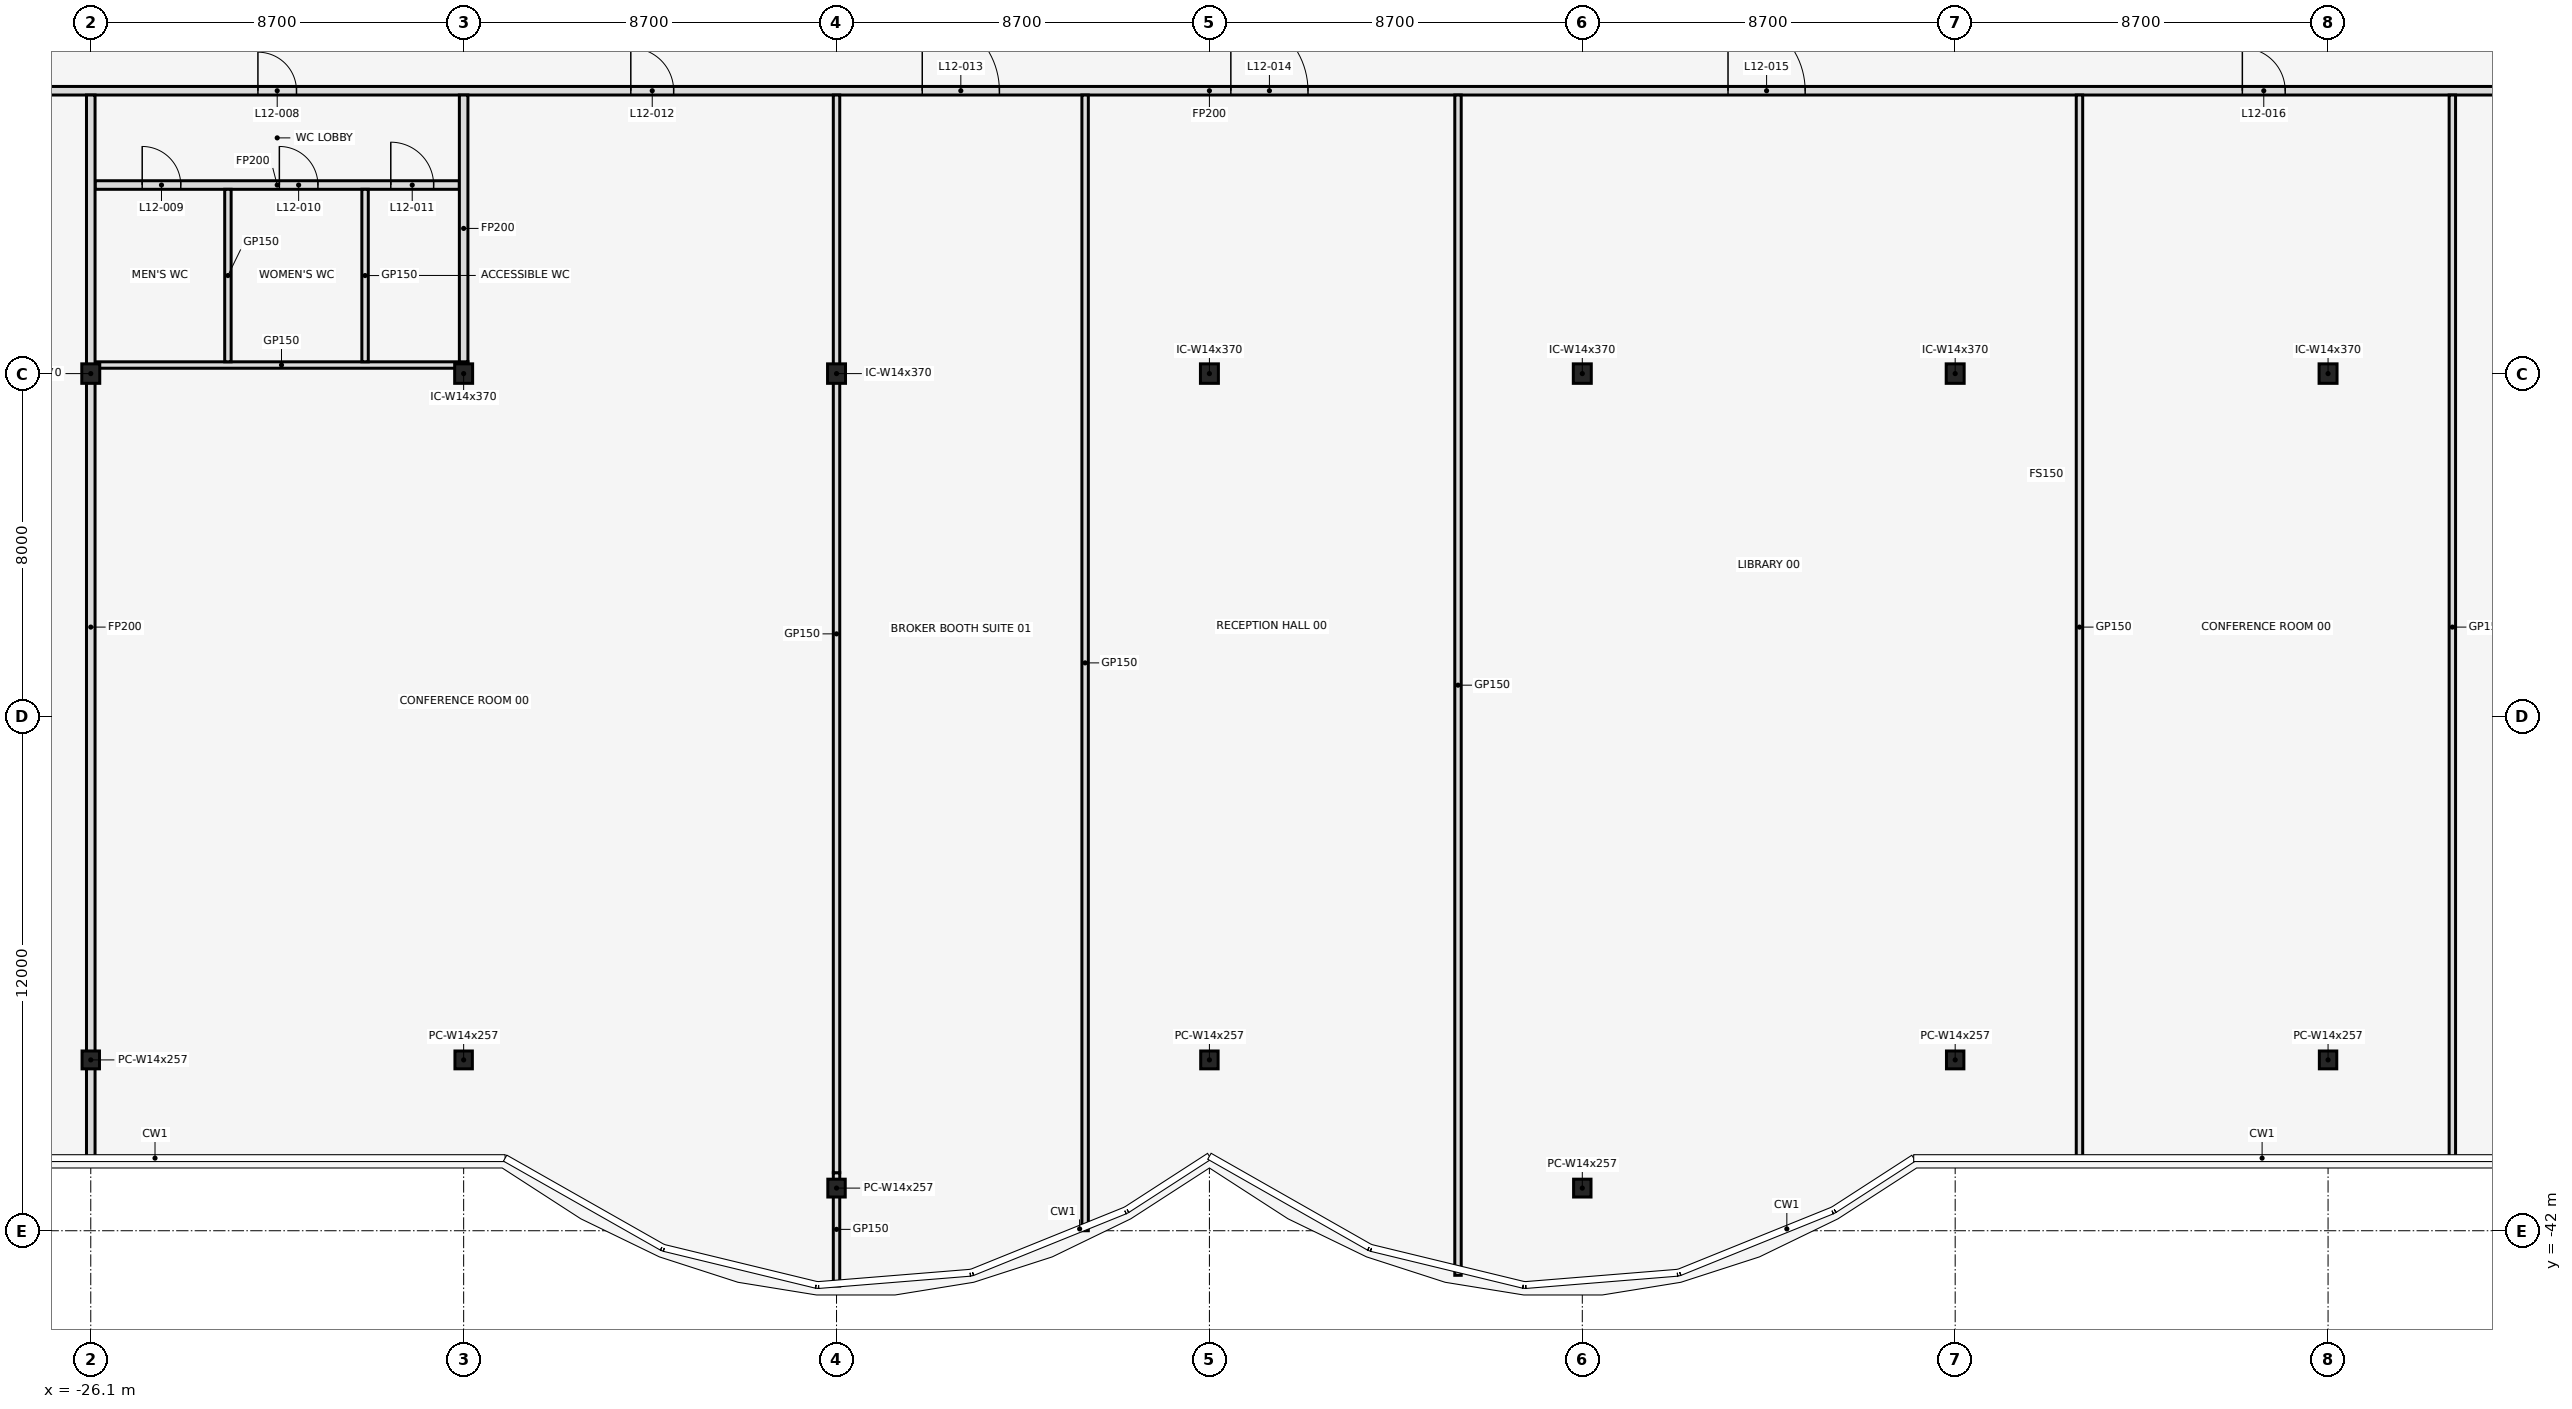
"""IFC4 building model, lengths in metres.
Left out: names, types, materials, properties, quantities, classifications, styles, units other than length and angle.
Written with IfcOpenShell. Run it as: python <this file> out.ifc"""

import sys

from ifc_helpers import new_model, si_unit, direction, frame, frame_2d, origin, origin_2d, place, context, subcontext, project, spatial, rectangle, i_section, extrude, element, fill, save


model = new_model("IFC4")
c1 = context("Model", 3, precision=1e-05, world=origin(), true_north=direction((0.0, 1.0)))
c2 = subcontext(c1, "Body", "Model", "MODEL_VIEW")
j1 = project(units=[si_unit("LENGTHUNIT", "METRE"), si_unit("PLANEANGLEUNIT", "RADIAN")], contexts=[c1])
p1 = place(None, origin())
s1 = spatial("IfcSite", under=j1, at=p1, CompositionType="ELEMENT")
p2 = place(p1, origin())
s2 = spatial("IfcBuilding", under=s1, at=p2, CompositionType="ELEMENT")
p3 = place(p2, frame((0.0, 0.0, 62.0)))
s3 = spatial("IfcBuildingStorey", under=s2, at=p3, CompositionType="ELEMENT", Elevation=62.0)
for number, where, z_axis, x_axis in (
    (1, (-26.1, -38.014, 0.0), (0.0, 0.0, 1.0), (1.0, 0.0, 0.0)),
    (2, (-17.4, -38.014, 0.0), (0.0, 0.0, 1.0), (1.0, 0.0, 0.0)),
    (3, (-8.7, -41.005, 0.0), (0.0, 0.0, 1.0), (1.0, 0.0, 0.0)),
    (4, (0.0, -38.014, 0.0), (0.0, 0.0, 1.0), (1.0, 0.0, 0.0)),
    (5, (8.7, -41.005, 0.0), (0.0, 0.0, 1.0), (1.0, 0.0, 0.0)),
    (6, (17.4, -38.014, 0.0), (0.0, 0.0, 1.0), (1.0, 0.0, 0.0)),
    (7, (26.1, -38.014, 0.0), (0.0, 0.0, 1.0), (1.0, 0.0, 0.0)),
):
    element("IfcColumn", number, at=place(p3, frame(where, z_axis=z_axis, x_axis=x_axis)), inside=s3, PredefinedType="COLUMN", context=c2, shape_type="SweptSolid", body=[
        extrude(i_section(OverallWidth=0.406, OverallDepth=0.417, WebThickness=0.03, FlangeThickness=0.048, at=origin_2d()), origin(), (0.0, 0.0, 1.0), 4.5),
    ])
for number, where, z_axis, x_axis in (
    (8, (-26.1, -22.0, 0.0), (0.0, 0.0, 1.0), (1.0, 0.0, 0.0)),
    (9, (-17.4, -22.0, 0.0), (0.0, 0.0, 1.0), (1.0, 0.0, 0.0)),
    (10, (-8.7, -22.0, 0.0), (0.0, 0.0, 1.0), (1.0, 0.0, 0.0)),
    (11, (0.0, -22.0, 0.0), (0.0, 0.0, 1.0), (1.0, 0.0, 0.0)),
    (12, (8.7, -22.0, 0.0), (0.0, 0.0, 1.0), (1.0, 0.0, 0.0)),
    (13, (17.4, -22.0, 0.0), (0.0, 0.0, 1.0), (1.0, 0.0, 0.0)),
    (14, (26.1, -22.0, 0.0), (0.0, 0.0, 1.0), (1.0, 0.0, 0.0)),
):
    element("IfcColumn", number, at=place(p3, frame(where, z_axis=z_axis, x_axis=x_axis)), inside=s3, PredefinedType="COLUMN", context=c2, shape_type="SweptSolid", body=[
        extrude(i_section(OverallWidth=0.419, OverallDepth=0.455, WebThickness=0.042, FlangeThickness=0.068, at=origin_2d()), origin(), (0.0, 0.0, 1.0), 4.5),
    ])
p4 = place(p3, frame((-26.0, -21.8, 0.0), z_axis=(0.0, 0.0, 1.0), x_axis=(1.0, 0.0, 0.0)))
e15 = element("IfcWall", 15, at=p4, inside=s3, PredefinedType="PARTITIONING", context=c2, shape_type="SweptSolid", body=[
    extrude(rectangle(XDim=8.7, YDim=0.15, at=frame_2d((4.35, 0.0))), origin(), (0.0, 0.0, 1.0), 3.418),
])
p5 = place(p3, frame((-26.0, -17.6, 0.0), z_axis=(0.0, 0.0, 1.0), x_axis=(1.0, 0.0, 0.0)))
e16 = element("IfcWall", 16, at=p5, inside=s3, PredefinedType="PARTITIONING", context=c2, shape_type="SweptSolid", body=[
    extrude(rectangle(XDim=8.5, YDim=0.2, at=frame_2d((4.25, 0.0))), origin(), (0.0, 0.0, 1.0), 3.418),
])
p6 = place(p5, frame((1.1, 0.0, 0.0)))
e17 = element("IfcOpeningElement", 17, at=p6, cuts=e16, PredefinedType="OPENING", context=c2, shape_type="SweptSolid", body=[
    extrude(rectangle(XDim=0.9, YDim=2.1, at=frame_2d((0.45, 1.05))), frame((0.0, 0.112, 0.0), z_axis=(0.0, -1.0, 0.0), x_axis=(1.0, 0.0, 0.0)), (0.0, 0.0, 1.0), 0.224),
])
p7 = place(p5, frame((4.3, 0.0, 0.0)))
e18 = element("IfcOpeningElement", 18, at=p7, cuts=e16, PredefinedType="OPENING", context=c2, shape_type="SweptSolid", body=[
    extrude(rectangle(XDim=0.9, YDim=2.1, at=frame_2d((0.45, 1.05))), frame((0.0, 0.112, 0.0), z_axis=(0.0, -1.0, 0.0), x_axis=(1.0, 0.0, 0.0)), (0.0, 0.0, 1.0), 0.224),
])
p8 = place(p5, frame((6.9, 0.0, 0.0)))
e19 = element("IfcOpeningElement", 19, at=p8, cuts=e16, PredefinedType="OPENING", context=c2, shape_type="SweptSolid", body=[
    extrude(rectangle(XDim=1.0, YDim=2.1, at=frame_2d((0.5, 1.05))), frame((0.0, 0.112, 0.0), z_axis=(0.0, -1.0, 0.0), x_axis=(1.0, 0.0, 0.0)), (0.0, 0.0, 1.0), 0.224),
])
p9 = place(p3, frame((-33.37, -15.4, 0.0), z_axis=(0.0, 0.0, 1.0), x_axis=(1.0, 0.0, 0.0)))
e20 = element("IfcWall", 20, at=p9, inside=s3, PredefinedType="PARTITIONING", context=c2, shape_type="SweptSolid", body=[
    extrude(rectangle(XDim=66.74, YDim=0.2, at=frame_2d((33.37, 0.0))), origin(), (0.0, 0.0, 1.0), 3.418),
])
p10 = place(p9, frame((2.8, 0.0, 0.0)))
e21 = element("IfcOpeningElement", 21, at=p10, cuts=e20, PredefinedType="OPENING", context=c2, shape_type="SweptSolid", body=[
    extrude(rectangle(XDim=1.8, YDim=2.1, at=frame_2d((0.9, 1.05))), frame((0.0, 0.112, 0.0), z_axis=(0.0, -1.0, 0.0), x_axis=(1.0, 0.0, 0.0)), (0.0, 0.0, 1.0), 0.224),
])
p11 = place(p9, frame((11.17, 0.0, 0.0)))
e22 = element("IfcOpeningElement", 22, at=p11, cuts=e20, PredefinedType="OPENING", context=c2, shape_type="SweptSolid", body=[
    extrude(rectangle(XDim=0.9, YDim=2.1, at=frame_2d((0.45, 1.05))), frame((0.0, 0.112, 0.0), z_axis=(0.0, -1.0, 0.0), x_axis=(1.0, 0.0, 0.0)), (0.0, 0.0, 1.0), 0.224),
])
p12 = place(p9, frame((19.87, 0.0, 0.0)))
e23 = element("IfcOpeningElement", 23, at=p12, cuts=e20, PredefinedType="OPENING", context=c2, shape_type="SweptSolid", body=[
    extrude(rectangle(XDim=1.0, YDim=2.1, at=frame_2d((0.5, 1.05))), frame((0.0, 0.112, 0.0), z_axis=(0.0, -1.0, 0.0), x_axis=(1.0, 0.0, 0.0)), (0.0, 0.0, 1.0), 0.224),
])
p13 = place(p9, frame((26.67, 0.0, 0.0)))
e24 = element("IfcOpeningElement", 24, at=p13, cuts=e20, PredefinedType="OPENING", context=c2, shape_type="SweptSolid", body=[
    extrude(rectangle(XDim=1.8, YDim=2.1, at=frame_2d((0.9, 1.05))), frame((0.0, 0.112, 0.0), z_axis=(0.0, -1.0, 0.0), x_axis=(1.0, 0.0, 0.0)), (0.0, 0.0, 1.0), 0.224),
])
p14 = place(p9, frame((33.87, 0.0, 0.0)))
e25 = element("IfcOpeningElement", 25, at=p14, cuts=e20, PredefinedType="OPENING", context=c2, shape_type="SweptSolid", body=[
    extrude(rectangle(XDim=1.8, YDim=2.1, at=frame_2d((0.9, 1.05))), frame((0.0, 0.112, 0.0), z_axis=(0.0, -1.0, 0.0), x_axis=(1.0, 0.0, 0.0)), (0.0, 0.0, 1.0), 0.224),
])
p15 = place(p9, frame((45.47, 0.0, 0.0)))
e26 = element("IfcOpeningElement", 26, at=p15, cuts=e20, PredefinedType="OPENING", context=c2, shape_type="SweptSolid", body=[
    extrude(rectangle(XDim=1.8, YDim=2.1, at=frame_2d((0.9, 1.05))), frame((0.0, 0.112, 0.0), z_axis=(0.0, -1.0, 0.0), x_axis=(1.0, 0.0, 0.0)), (0.0, 0.0, 1.0), 0.224),
])
p16 = place(p9, frame((57.47, 0.0, 0.0)))
e27 = element("IfcOpeningElement", 27, at=p16, cuts=e20, PredefinedType="OPENING", context=c2, shape_type="SweptSolid", body=[
    extrude(rectangle(XDim=1.0, YDim=2.1, at=frame_2d((0.5, 1.05))), frame((0.0, 0.112, 0.0), z_axis=(0.0, -1.0, 0.0), x_axis=(1.0, 0.0, 0.0)), (0.0, 0.0, 1.0), 0.224),
])
p17 = place(p9, frame((63.57, 0.0, 0.0)))
e28 = element("IfcOpeningElement", 28, at=p17, cuts=e20, PredefinedType="OPENING", context=c2, shape_type="SweptSolid", body=[
    extrude(rectangle(XDim=1.8, YDim=2.1, at=frame_2d((0.9, 1.05))), frame((0.0, 0.112, 0.0), z_axis=(0.0, -1.0, 0.0), x_axis=(1.0, 0.0, 0.0)), (0.0, 0.0, 1.0), 0.224),
])
p18 = place(p3, frame((-26.1, -40.33, 0.0), z_axis=(0.0, 0.0, 1.0), x_axis=(0.0, 1.0, 0.0)))
e29 = element("IfcWall", 29, at=p18, inside=s3, PredefinedType="PARTITIONING", context=c2, shape_type="SweptSolid", body=[
    extrude(rectangle(XDim=24.83, YDim=0.2, at=frame_2d((12.415, 0.0))), origin(), (0.0, 0.0, 1.0), 3.418),
])
for number, where, z_axis, x_axis in (
    (30, (-22.9, -21.725, 0.0), (0.0, 0.0, 1.0), (0.0, 1.0, 0.0)),
    (31, (-19.7, -21.725, 0.0), (0.0, 0.0, 1.0), (0.0, 1.0, 0.0)),
):
    element("IfcWall", number, at=place(p3, frame(where, z_axis=z_axis, x_axis=x_axis)), inside=s3, PredefinedType="PARTITIONING", context=c2, shape_type="SweptSolid", body=[
        extrude(rectangle(XDim=4.025, YDim=0.15, at=frame_2d((2.013, 0.0))), origin(), (0.0, 0.0, 1.0), 3.418),
    ])
p19 = place(p3, frame((-17.4, -21.725, 0.0), z_axis=(0.0, 0.0, 1.0), x_axis=(0.0, 1.0, 0.0)))
e32 = element("IfcWall", 32, at=p19, inside=s3, PredefinedType="PARTITIONING", context=c2, shape_type="SweptSolid", body=[
    extrude(rectangle(XDim=6.225, YDim=0.2, at=frame_2d((3.113, 0.0))), origin(), (0.0, 0.0, 1.0), 3.418),
])
p20 = place(p3, frame((-8.7, -43.29, 0.0), z_axis=(0.0, 0.0, 1.0), x_axis=(0.0, 1.0, 0.0)))
e33 = element("IfcWall", 33, at=p20, inside=s3, PredefinedType="PARTITIONING", context=c2, shape_type="SweptSolid", body=[
    extrude(rectangle(XDim=2.644, YDim=0.15, at=frame_2d((1.322, 0.0))), origin(), (0.0, 0.0, 1.0), 3.418),
])
p21 = place(p3, frame((-8.7, -40.646, 0.0), z_axis=(0.0, 0.0, 1.0), x_axis=(0.0, 1.0, 0.0)))
e34 = element("IfcWall", 34, at=p21, inside=s3, PredefinedType="PARTITIONING", context=c2, shape_type="SweptSolid", body=[
    extrude(rectangle(XDim=25.146, YDim=0.15, at=frame_2d((12.573, 0.0))), origin(), (0.0, 0.0, 1.0), 3.418),
])
p22 = place(p3, frame((-2.9, -42.0, 0.0), z_axis=(0.0, 0.0, 1.0), x_axis=(0.0, 1.0, 0.0)))
e35 = element("IfcWall", 35, at=p22, inside=s3, PredefinedType="PARTITIONING", context=c2, shape_type="SweptSolid", body=[
    extrude(rectangle(XDim=26.5, YDim=0.15, at=frame_2d((13.25, 0.0))), origin(), (0.0, 0.0, 1.0), 3.418),
])
p23 = place(p3, frame((5.8, -43.04, 0.0), z_axis=(0.0, 0.0, 1.0), x_axis=(0.0, 1.0, 0.0)))
e36 = element("IfcWall", 36, at=p23, inside=s3, PredefinedType="PARTITIONING", context=c2, shape_type="SweptSolid", body=[
    extrude(rectangle(XDim=27.54, YDim=0.15, at=frame_2d((13.77, 0.0))), origin(), (0.0, 0.0, 1.0), 3.418),
])
for number, where, z_axis, x_axis in (
    (37, (20.3, -40.33, 0.0), (0.0, 0.0, 1.0), (0.0, 1.0, 0.0)),
    (38, (29.0, -40.33, 0.0), (0.0, 0.0, 1.0), (0.0, 1.0, 0.0)),
):
    element("IfcWall", number, at=place(p3, frame(where, z_axis=z_axis, x_axis=x_axis)), inside=s3, PredefinedType="PARTITIONING", context=c2, shape_type="SweptSolid", body=[
        extrude(rectangle(XDim=24.83, YDim=0.15, at=frame_2d((12.415, 0.0))), origin(), (0.0, 0.0, 1.0), 3.418),
    ])
p24 = place(p11, frame((0.9, 0.0, 0.0), z_axis=(0.0, 0.0, 1.0), x_axis=(-1.0, 0.0, 0.0)))
e39 = element("IfcDoor", 39, at=p24, inside=s3, OperationType="SINGLE_SWING_RIGHT", PredefinedType="DOOR", context=c2, shape_type="SweptSolid", body=[
    extrude(rectangle(XDim=0.9, YDim=2.1, at=frame_2d((0.45, 1.05))), frame((0.0, 0.025, 0.0), z_axis=(0.0, -1.0, 0.0), x_axis=(1.0, 0.0, 0.0)), (0.0, 0.0, 1.0), 0.05),
])
fill(e22, e39)
p25 = place(p6, frame((0.9, 0.0, 0.0), z_axis=(0.0, 0.0, 1.0), x_axis=(-1.0, 0.0, 0.0)))
e40 = element("IfcDoor", 40, at=p25, inside=s3, OperationType="SINGLE_SWING_RIGHT", PredefinedType="DOOR", context=c2, shape_type="SweptSolid", body=[
    extrude(rectangle(XDim=0.9, YDim=2.1, at=frame_2d((0.45, 1.05))), frame((0.0, 0.025, 0.0), z_axis=(0.0, -1.0, 0.0), x_axis=(1.0, 0.0, 0.0)), (0.0, 0.0, 1.0), 0.05),
])
fill(e17, e40)
p26 = place(p7, frame((0.9, 0.0, 0.0), z_axis=(0.0, 0.0, 1.0), x_axis=(-1.0, 0.0, 0.0)))
e41 = element("IfcDoor", 41, at=p26, inside=s3, OperationType="SINGLE_SWING_LEFT", PredefinedType="DOOR", context=c2, shape_type="SweptSolid", body=[
    extrude(rectangle(XDim=0.9, YDim=2.1, at=frame_2d((0.45, 1.05))), frame((0.0, 0.025, 0.0), z_axis=(0.0, -1.0, 0.0), x_axis=(1.0, 0.0, 0.0)), (0.0, 0.0, 1.0), 0.05),
])
fill(e18, e41)
p27 = place(p8, frame((1.0, 0.0, 0.0), z_axis=(0.0, 0.0, 1.0), x_axis=(-1.0, 0.0, 0.0)))
e42 = element("IfcDoor", 42, at=p27, inside=s3, OperationType="SINGLE_SWING_RIGHT", PredefinedType="DOOR", context=c2, shape_type="SweptSolid", body=[
    extrude(rectangle(XDim=1.0, YDim=2.1, at=frame_2d((0.5, 1.05))), frame((0.0, 0.025, 0.0), z_axis=(0.0, -1.0, 0.0), x_axis=(1.0, 0.0, 0.0)), (0.0, 0.0, 1.0), 0.05),
])
fill(e19, e42)
p28 = place(p12, frame((1.0, 0.0, 0.0), z_axis=(0.0, 0.0, 1.0), x_axis=(-1.0, 0.0, 0.0)))
e43 = element("IfcDoor", 43, at=p28, inside=s3, OperationType="SINGLE_SWING_RIGHT", PredefinedType="DOOR", context=c2, shape_type="SweptSolid", body=[
    extrude(rectangle(XDim=1.0, YDim=2.1, at=frame_2d((0.5, 1.05))), frame((0.0, 0.025, 0.0), z_axis=(0.0, -1.0, 0.0), x_axis=(1.0, 0.0, 0.0)), (0.0, 0.0, 1.0), 0.05),
])
fill(e23, e43)
p29 = place(p13, origin())
e44 = element("IfcDoor", 44, at=p29, inside=s3, OperationType="SINGLE_SWING_LEFT", PredefinedType="DOOR", context=c2, shape_type="SweptSolid", body=[
    extrude(rectangle(XDim=1.8, YDim=2.1, at=frame_2d((0.9, 1.05))), frame((0.0, 0.025, 0.0), z_axis=(0.0, -1.0, 0.0), x_axis=(1.0, 0.0, 0.0)), (0.0, 0.0, 1.0), 0.05),
])
fill(e24, e44)
p30 = place(p14, origin())
e45 = element("IfcDoor", 45, at=p30, inside=s3, OperationType="SINGLE_SWING_LEFT", PredefinedType="DOOR", context=c2, shape_type="SweptSolid", body=[
    extrude(rectangle(XDim=1.8, YDim=2.1, at=frame_2d((0.9, 1.05))), frame((0.0, 0.025, 0.0), z_axis=(0.0, -1.0, 0.0), x_axis=(1.0, 0.0, 0.0)), (0.0, 0.0, 1.0), 0.05),
])
fill(e25, e45)
p31 = place(p15, origin())
e46 = element("IfcDoor", 46, at=p31, inside=s3, OperationType="SINGLE_SWING_LEFT", PredefinedType="DOOR", context=c2, shape_type="SweptSolid", body=[
    extrude(rectangle(XDim=1.8, YDim=2.1, at=frame_2d((0.9, 1.05))), frame((0.0, 0.025, 0.0), z_axis=(0.0, -1.0, 0.0), x_axis=(1.0, 0.0, 0.0)), (0.0, 0.0, 1.0), 0.05),
])
fill(e26, e46)
p32 = place(p16, frame((1.0, 0.0, 0.0), z_axis=(0.0, 0.0, 1.0), x_axis=(-1.0, 0.0, 0.0)))
e47 = element("IfcDoor", 47, at=p32, inside=s3, OperationType="SINGLE_SWING_LEFT", PredefinedType="DOOR", context=c2, shape_type="SweptSolid", body=[
    extrude(rectangle(XDim=1.0, YDim=2.1, at=frame_2d((0.5, 1.05))), frame((0.0, 0.025, 0.0), z_axis=(0.0, -1.0, 0.0), x_axis=(1.0, 0.0, 0.0)), (0.0, 0.0, 1.0), 0.05),
])
fill(e27, e47)
save(model, sys.argv[1])
